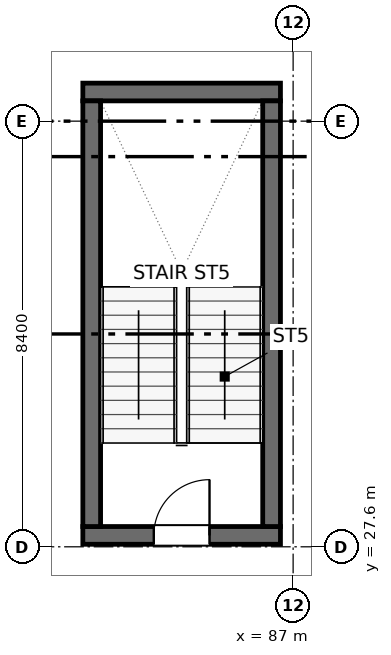
"""IFC4 building model, lengths in metres.
Left out: names, types, materials, properties, quantities, classifications, styles, units other than length and angle.
Written with IfcOpenShell. Run it as: python <this file> out.ifc"""

import sys

from ifc_helpers import new_model, si_unit, direction, frame, frame_2d, origin, place, context, subcontext, project, spatial, rectangle, extrude, element, fill, save


model = new_model("IFC4")
c1 = context("Model", 3, precision=1e-05, world=origin(), true_north=direction((0.0, 1.0)))
c2 = subcontext(c1, "Body", "Model", "MODEL_VIEW")
j1 = project(units=[si_unit("LENGTHUNIT", "METRE"), si_unit("PLANEANGLEUNIT", "RADIAN")], contexts=[c1])
p1 = place(None, origin())
s1 = spatial("IfcSite", under=j1, at=p1, CompositionType="ELEMENT")
p2 = place(p1, origin())
s2 = spatial("IfcBuilding", under=s1, at=p2, CompositionType="ELEMENT")
p3 = place(p2, frame((0.0, 0.0, 4.5)))
s3 = spatial("IfcBuildingStorey", under=s2, at=p3, CompositionType="ELEMENT", Elevation=4.5)
p4 = place(p3, frame((82.85, 27.825, 0.0), z_axis=(0.0, 0.0, 1.0), x_axis=(1.0, 0.0, 0.0)))
e1 = element("IfcWall", 1, at=p4, inside=s3, PredefinedType="SHEAR", context=c2, shape_type="SweptSolid", body=[
    extrude(rectangle(XDim=3.9, YDim=0.35, at=frame_2d((1.95, 0.0))), origin(), (0.0, 0.0, 1.0), 4.2),
])
p5 = place(p4, frame((1.4, 0.0, 0.0)))
e2 = element("IfcOpeningElement", 2, at=p5, cuts=e1, PredefinedType="OPENING", context=c2, shape_type="SweptSolid", body=[
    extrude(rectangle(XDim=1.1, YDim=2.05, at=frame_2d((0.55, 1.025))), frame((0.0, 0.185, 0.0), z_axis=(0.0, -1.0, 0.0), x_axis=(1.0, 0.0, 0.0)), (0.0, 0.0, 1.0), 0.37),
])
p6 = place(p3, frame((82.85, 36.575, 0.0), z_axis=(0.0, 0.0, 1.0), x_axis=(1.0, 0.0, 0.0)))
e3 = element("IfcWall", 3, at=p6, inside=s3, PredefinedType="SHEAR", context=c2, shape_type="SweptSolid", body=[
    extrude(rectangle(XDim=3.9, YDim=0.35, at=frame_2d((1.95, 0.0))), origin(), (0.0, 0.0, 1.0), 4.2),
])
for number, where, z_axis, x_axis in (
    (4, (83.025, 28.0, 0.0), (0.0, 0.0, 1.0), (0.0, 1.0, 0.0)),
    (5, (86.575, 28.0, 0.0), (0.0, 0.0, 1.0), (0.0, 1.0, 0.0)),
):
    element("IfcWall", number, at=place(p3, frame(where, z_axis=z_axis, x_axis=x_axis)), inside=s3, PredefinedType="SHEAR", context=c2, shape_type="SweptSolid", body=[
        extrude(rectangle(XDim=8.4, YDim=0.35, at=frame_2d((4.2, 0.0))), origin(), (0.0, 0.0, 1.0), 4.2),
    ])
p7 = place(p5, origin())
e6 = element("IfcDoor", 6, at=p7, inside=s3, OperationType="SINGLE_SWING_RIGHT", PredefinedType="DOOR", context=c2, shape_type="SweptSolid", body=[
    extrude(rectangle(XDim=1.1, YDim=2.05, at=frame_2d((0.55, 1.025))), frame((0.0, 0.025, 0.0), z_axis=(0.0, -1.0, 0.0), x_axis=(1.0, 0.0, 0.0)), (0.0, 0.0, 1.0), 0.05),
])
fill(e2, e6)
save(model, sys.argv[1])
